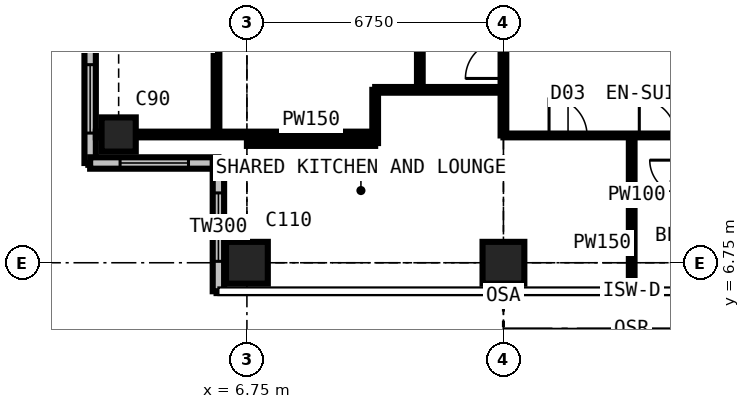
"""IFC4 building model, lengths in metres.
Left out: names, types, materials, properties, quantities, classifications, styles, units other than length and angle.
Written with IfcOpenShell. Run it as: python <this file> out.ifc"""

import sys

from ifc_helpers import new_model, si_unit, direction, frame, frame_2d, origin, origin_2d, place, context, subcontext, project, spatial, rectangle, extrude, element, fill, save


model = new_model("IFC4")
c1 = context("Model", 3, precision=1e-05, world=origin(), true_north=direction((0.0, 1.0)))
c2 = subcontext(c1, "Body", "Model", "MODEL_VIEW")
j1 = project(units=[si_unit("LENGTHUNIT", "METRE"), si_unit("PLANEANGLEUNIT", "RADIAN")], contexts=[c1])
p1 = place(None, origin())
s1 = spatial("IfcSite", under=j1, at=p1, CompositionType="ELEMENT")
p2 = place(p1, origin())
s2 = spatial("IfcBuilding", under=s1, at=p2, CompositionType="ELEMENT")
p3 = place(p2, frame((0.0, 0.0, 222.3)))
s3 = spatial("IfcBuildingStorey", under=s2, at=p3, CompositionType="ELEMENT", Elevation=222.3)
p4 = place(p3, frame((3.375, 10.125, 0.0), z_axis=(0.0, 0.0, 1.0), x_axis=(1.0, 0.0, 0.0)))
e1 = element("IfcColumn", 1, at=p4, inside=s3, PredefinedType="COLUMN", context=c2, shape_type="SweptSolid", body=[
    extrude(rectangle(XDim=0.9, YDim=0.9, at=origin_2d()), origin(), (0.0, 0.0, 1.0), 3.6),
])
for number, where, z_axis, x_axis in (
    (2, (6.75, 6.75, 0.0), (0.0, 0.0, 1.0), (1.0, 0.0, 0.0)),
    (3, (13.5, 6.75, 0.0), (0.0, 0.0, 1.0), (1.0, 0.0, 0.0)),
):
    element("IfcColumn", number, at=place(p3, frame(where, z_axis=z_axis, x_axis=x_axis)), inside=s3, PredefinedType="COLUMN", context=c2, shape_type="SweptSolid", body=[
        extrude(rectangle(XDim=1.1, YDim=1.1, at=origin_2d()), origin(), (0.0, 0.0, 1.0), 3.6),
    ])
p5 = place(p3, frame((2.625, 12.75, 0.0), z_axis=(0.0, 0.0, 1.0), x_axis=(0.0, -1.0, 0.0)))
e4 = element("IfcWall", 4, at=p5, inside=s3, PredefinedType="SOLIDWALL", context=c2, shape_type="SweptSolid", body=[
    extrude(rectangle(XDim=3.375, YDim=0.3, at=frame_2d((1.688, 0.0))), origin(), (0.0, 0.0, 1.0), 3.375),
])
p6 = place(p5, frame((0.788, 0.0, 0.6)))
e5 = element("IfcOpeningElement", 5, at=p6, cuts=e4, PredefinedType="OPENING", context=c2, shape_type="SweptSolid", body=[
    extrude(rectangle(XDim=1.8, YDim=2.1, at=frame_2d((0.9, 1.05))), frame((0.0, 0.16, 0.0), z_axis=(0.0, -1.0, 0.0), x_axis=(1.0, 0.0, 0.0)), (0.0, 0.0, 1.0), 0.32),
])
p7 = place(p3, frame((2.625, 9.375, 0.0), z_axis=(0.0, 0.0, 1.0), x_axis=(1.0, 0.0, 0.0)))
e6 = element("IfcWall", 6, at=p7, inside=s3, PredefinedType="SOLIDWALL", context=c2, shape_type="SweptSolid", body=[
    extrude(rectangle(XDim=3.375, YDim=0.3, at=frame_2d((1.688, 0.0))), origin(), (0.0, 0.0, 1.0), 3.375),
])
p8 = place(p7, frame((0.788, 0.0, 0.6)))
e7 = element("IfcOpeningElement", 7, at=p8, cuts=e6, PredefinedType="OPENING", context=c2, shape_type="SweptSolid", body=[
    extrude(rectangle(XDim=1.8, YDim=2.1, at=frame_2d((0.9, 1.05))), frame((0.0, 0.16, 0.0), z_axis=(0.0, -1.0, 0.0), x_axis=(1.0, 0.0, 0.0)), (0.0, 0.0, 1.0), 0.32),
])
p9 = place(p3, frame((6.0, 9.375, 0.0), z_axis=(0.0, 0.0, 1.0), x_axis=(0.0, -1.0, 0.0)))
e8 = element("IfcWall", 8, at=p9, inside=s3, PredefinedType="SOLIDWALL", context=c2, shape_type="SweptSolid", body=[
    extrude(rectangle(XDim=3.375, YDim=0.3, at=frame_2d((1.688, 0.0))), origin(), (0.0, 0.0, 1.0), 3.375),
])
p10 = place(p9, frame((0.788, 0.0, 0.6)))
e9 = element("IfcOpeningElement", 9, at=p10, cuts=e8, PredefinedType="OPENING", context=c2, shape_type="SweptSolid", body=[
    extrude(rectangle(XDim=1.8, YDim=2.1, at=frame_2d((0.9, 1.05))), frame((0.0, 0.16, 0.0), z_axis=(0.0, -1.0, 0.0), x_axis=(1.0, 0.0, 0.0)), (0.0, 0.0, 1.0), 0.32),
])
p11 = place(p3, frame((2.775, 10.125, 0.0), z_axis=(0.0, 0.0, 1.0), x_axis=(1.0, 0.0, 0.0)))
e10 = element("IfcWall", 10, at=p11, inside=s3, PredefinedType="PARTITIONING", context=c2, shape_type="SweptSolid", body=[
    extrude(rectangle(XDim=7.35, YDim=0.15, at=frame_2d((3.675, 0.0))), origin(), (0.0, 0.0, 1.0), 2.877),
])
p12 = place(p3, frame((5.95, 10.125, 0.0), z_axis=(0.0, 0.0, 1.0), x_axis=(0.0, 1.0, 0.0)))
e11 = element("IfcWall", 11, at=p12, inside=s3, PredefinedType="PARTITIONING", context=c2, shape_type="SweptSolid", body=[
    extrude(rectangle(XDim=2.65, YDim=0.15, at=frame_2d((1.325, 0.0))), origin(), (0.0, 0.0, 1.0), 3.375),
])
p13 = place(p3, frame((6.75, 9.9, 0.0), z_axis=(0.0, 0.0, 1.0), x_axis=(1.0, 0.0, 0.0)))
e12 = element("IfcWall", 12, at=p13, inside=s3, PredefinedType="PARTITIONING", context=c2, shape_type="SweptSolid", body=[
    extrude(rectangle(XDim=3.375, YDim=0.15, at=frame_2d((1.688, 0.0))), origin(), (0.0, 0.0, 1.0), 3.375),
])
p14 = place(p3, frame((10.125, 9.9, 0.0), z_axis=(0.0, 0.0, 1.0), x_axis=(0.0, 1.0, 0.0)))
e13 = element("IfcWall", 13, at=p14, inside=s3, PredefinedType="PARTITIONING", context=c2, shape_type="SweptSolid", body=[
    extrude(rectangle(XDim=1.4, YDim=0.15, at=frame_2d((0.7, 0.0))), origin(), (0.0, 0.0, 1.0), 3.375),
])
p15 = place(p3, frame((10.125, 11.3, 0.0), z_axis=(0.0, 0.0, 1.0), x_axis=(1.0, 0.0, 0.0)))
e14 = element("IfcWall", 14, at=p15, inside=s3, PredefinedType="PARTITIONING", context=c2, shape_type="SweptSolid", body=[
    extrude(rectangle(XDim=3.375, YDim=0.15, at=frame_2d((1.688, 0.0))), origin(), (0.0, 0.0, 1.0), 3.375),
])
p16 = place(p3, frame((11.3, 11.3, 0.0), z_axis=(0.0, 0.0, 1.0), x_axis=(0.0, 1.0, 0.0)))
e15 = element("IfcWall", 15, at=p16, inside=s3, PredefinedType="PARTITIONING", context=c2, shape_type="SweptSolid", body=[
    extrude(rectangle(XDim=19.3, YDim=0.15, at=frame_2d((9.65, 0.0))), origin(), (0.0, 0.0, 1.0), 3.375),
])
p17 = place(p16, frame((18.1, 0.0, 0.0)))
e16 = element("IfcOpeningElement", 16, at=p17, cuts=e15, PredefinedType="OPENING", context=c2, shape_type="SweptSolid", body=[
    extrude(rectangle(XDim=1.0, YDim=2.2, at=frame_2d((0.5, 1.1))), frame((0.0, 0.085, 0.0), z_axis=(0.0, -1.0, 0.0), x_axis=(1.0, 0.0, 0.0)), (0.0, 0.0, 1.0), 0.17),
])
p18 = place(p16, frame((12.137, 0.0, 0.0)))
e17 = element("IfcOpeningElement", 17, at=p18, cuts=e15, PredefinedType="OPENING", context=c2, shape_type="SweptSolid", body=[
    extrude(rectangle(XDim=1.0, YDim=2.2, at=frame_2d((0.5, 1.1))), frame((0.0, 0.085, 0.0), z_axis=(0.0, -1.0, 0.0), x_axis=(1.0, 0.0, 0.0)), (0.0, 0.0, 1.0), 0.17),
])
p19 = place(p3, frame((13.5, 10.1, 0.0), z_axis=(0.0, 0.0, 1.0), x_axis=(0.0, 1.0, 0.0)))
e18 = element("IfcWall", 18, at=p19, inside=s3, PredefinedType="PARTITIONING", context=c2, shape_type="SweptSolid", body=[
    extrude(rectangle(XDim=2.8, YDim=0.15, at=frame_2d((1.4, 0.0))), origin(), (0.0, 0.0, 1.0), 2.877),
])
p20 = place(p19, frame((1.5, 0.0, 0.0)))
e19 = element("IfcOpeningElement", 19, at=p20, cuts=e18, PredefinedType="OPENING", context=c2, shape_type="SweptSolid", body=[
    extrude(rectangle(XDim=1.0, YDim=2.2, at=frame_2d((0.5, 1.1))), frame((0.0, 0.085, 0.0), z_axis=(0.0, -1.0, 0.0), x_axis=(1.0, 0.0, 0.0)), (0.0, 0.0, 1.0), 0.17),
])
p21 = place(p3, frame((13.5, 10.1, 0.0), z_axis=(0.0, 0.0, 1.0), x_axis=(1.0, 0.0, 0.0)))
e20 = element("IfcWall", 20, at=p21, inside=s3, PredefinedType="PARTITIONING", context=c2, shape_type="SweptSolid", body=[
    extrude(rectangle(XDim=10.125, YDim=0.1, at=frame_2d((5.062, 0.0))), origin(), (0.0, 0.0, 1.0), 3.375),
])
p22 = place(p21, frame((1.2, 0.0, 0.0)))
e21 = element("IfcOpeningElement", 21, at=p22, cuts=e20, PredefinedType="OPENING", context=c2, shape_type="SweptSolid", body=[
    extrude(rectangle(XDim=1.0, YDim=2.2, at=frame_2d((0.5, 1.1))), frame((0.0, 0.06, 0.0), z_axis=(0.0, -1.0, 0.0), x_axis=(1.0, 0.0, 0.0)), (0.0, 0.0, 1.0), 0.12),
])
p23 = place(p21, frame((3.575, 0.0, 0.0)))
e22 = element("IfcOpeningElement", 22, at=p23, cuts=e20, PredefinedType="OPENING", context=c2, shape_type="SweptSolid", body=[
    extrude(rectangle(XDim=0.95, YDim=2.2, at=frame_2d((0.475, 1.1))), frame((0.0, 0.06, 0.0), z_axis=(0.0, -1.0, 0.0), x_axis=(1.0, 0.0, 0.0)), (0.0, 0.0, 1.0), 0.12),
])
p24 = place(p21, frame((6.95, 0.0, 0.0)))
e23 = element("IfcOpeningElement", 23, at=p24, cuts=e20, PredefinedType="OPENING", context=c2, shape_type="SweptSolid", body=[
    extrude(rectangle(XDim=0.95, YDim=2.2, at=frame_2d((0.475, 1.1))), frame((0.0, 0.06, 0.0), z_axis=(0.0, -1.0, 0.0), x_axis=(1.0, 0.0, 0.0)), (0.0, 0.0, 1.0), 0.12),
])
p25 = place(p3, frame((16.875, 6.016, 0.0), z_axis=(0.0, 0.0, 1.0), x_axis=(0.0, 1.0, 0.0)))
e24 = element("IfcWall", 24, at=p25, inside=s3, PredefinedType="PARTITIONING", context=c2, shape_type="SweptSolid", body=[
    extrude(rectangle(XDim=4.084, YDim=0.15, at=frame_2d((2.042, 0.0))), origin(), (0.0, 0.0, 1.0), 3.375),
])
p26 = place(p6, origin())
e25 = element("IfcWindow", 25, at=p26, inside=s3, PartitioningType="SINGLE_PANEL", PredefinedType="WINDOW", context=c2, shape_type="SweptSolid", body=[
    extrude(rectangle(XDim=1.8, YDim=2.1, at=frame_2d((0.9, 1.05))), frame((0.0, 0.03, 0.0), z_axis=(0.0, -1.0, 0.0), x_axis=(1.0, 0.0, 0.0)), (0.0, 0.0, 1.0), 0.06),
])
fill(e5, e25)
p27 = place(p8, origin())
e26 = element("IfcWindow", 26, at=p27, inside=s3, PartitioningType="SINGLE_PANEL", PredefinedType="WINDOW", context=c2, shape_type="SweptSolid", body=[
    extrude(rectangle(XDim=1.8, YDim=2.1, at=frame_2d((0.9, 1.05))), frame((0.0, 0.03, 0.0), z_axis=(0.0, -1.0, 0.0), x_axis=(1.0, 0.0, 0.0)), (0.0, 0.0, 1.0), 0.06),
])
fill(e7, e26)
p28 = place(p10, origin())
e27 = element("IfcWindow", 27, at=p28, inside=s3, PartitioningType="SINGLE_PANEL", PredefinedType="WINDOW", context=c2, shape_type="SweptSolid", body=[
    extrude(rectangle(XDim=1.8, YDim=2.1, at=frame_2d((0.9, 1.05))), frame((0.0, 0.03, 0.0), z_axis=(0.0, -1.0, 0.0), x_axis=(1.0, 0.0, 0.0)), (0.0, 0.0, 1.0), 0.06),
])
fill(e9, e27)
p29 = place(p22, origin())
e28 = element("IfcDoor", 28, at=p29, inside=s3, OperationType="SINGLE_SWING_LEFT", PredefinedType="DOOR", context=c2, shape_type="SweptSolid", body=[
    extrude(rectangle(XDim=1.0, YDim=2.2, at=frame_2d((0.5, 1.1))), frame((0.0, 0.025, 0.0), z_axis=(0.0, -1.0, 0.0), x_axis=(1.0, 0.0, 0.0)), (0.0, 0.0, 1.0), 0.05),
])
fill(e21, e28)
p30 = place(p23, origin())
e29 = element("IfcDoor", 29, at=p30, inside=s3, OperationType="SINGLE_SWING_LEFT", PredefinedType="DOOR", context=c2, shape_type="SweptSolid", body=[
    extrude(rectangle(XDim=0.95, YDim=2.2, at=frame_2d((0.475, 1.1))), frame((0.0, 0.025, 0.0), z_axis=(0.0, -1.0, 0.0), x_axis=(1.0, 0.0, 0.0)), (0.0, 0.0, 1.0), 0.05),
])
fill(e22, e29)
p31 = place(p20, origin())
e30 = element("IfcDoor", 30, at=p31, inside=s3, OperationType="SINGLE_SWING_LEFT", PredefinedType="DOOR", context=c2, shape_type="SweptSolid", body=[
    extrude(rectangle(XDim=1.0, YDim=2.2, at=frame_2d((0.5, 1.1))), frame((0.0, 0.025, 0.0), z_axis=(0.0, -1.0, 0.0), x_axis=(1.0, 0.0, 0.0)), (0.0, 0.0, 1.0), 0.05),
])
fill(e19, e30)
save(model, sys.argv[1])
